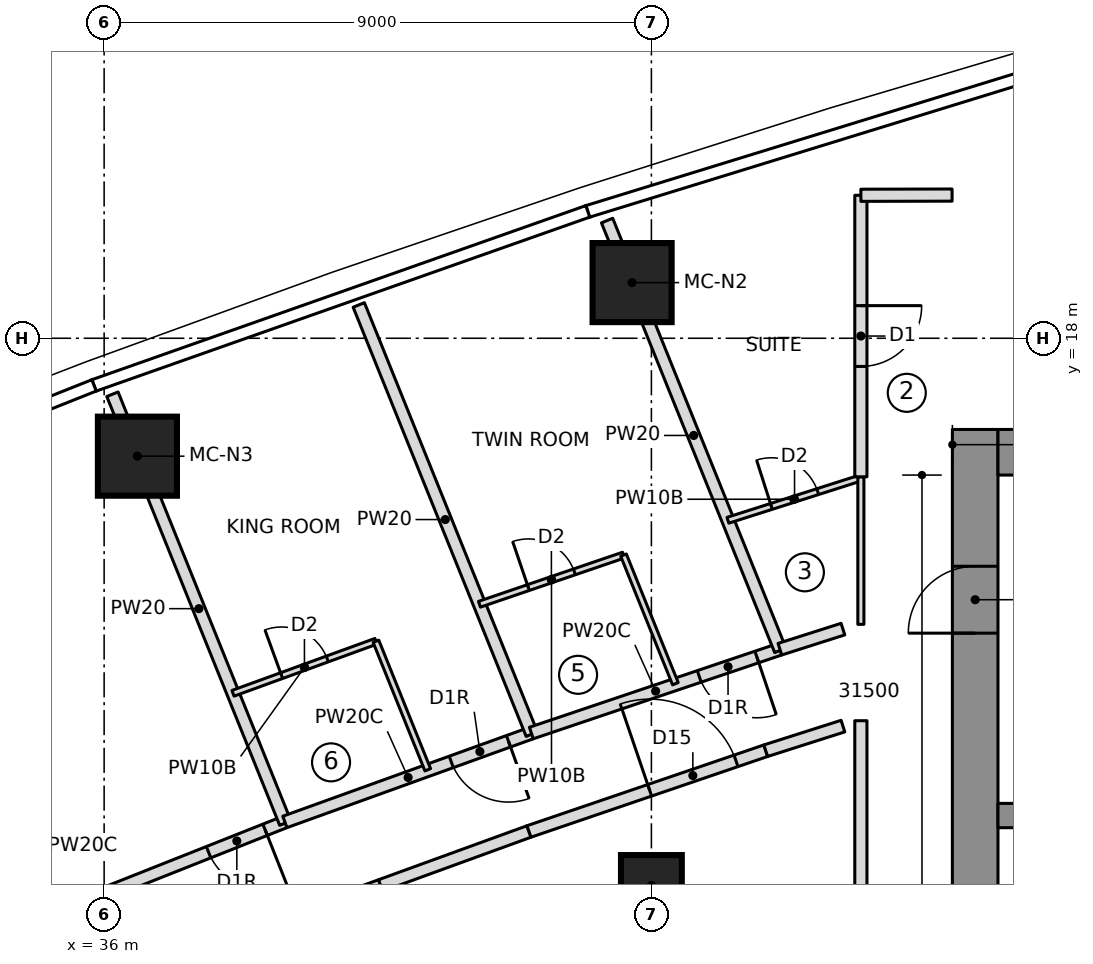
"""IFC4 building model, lengths in metres.
Left out: names, types, materials, properties, quantities, classifications, styles, units other than length and angle.
Written with IfcOpenShell. Run it as: python <this file> out.ifc"""

import sys

from ifc_helpers import new_model, si_unit, direction, frame, frame_2d, origin, origin_2d, place, context, subcontext, project, spatial, rectangle, extrude, element, fill, save


model = new_model("IFC4")
c1 = context("Model", 3, precision=1e-05, world=origin(), true_north=direction((0.0, 1.0)))
c2 = subcontext(c1, "Body", "Model", "MODEL_VIEW")
j1 = project(units=[si_unit("LENGTHUNIT", "METRE"), si_unit("PLANEANGLEUNIT", "RADIAN")], contexts=[c1])
p1 = place(None, origin())
s1 = spatial("IfcSite", under=j1, at=p1, CompositionType="ELEMENT")
p2 = place(p1, origin())
s2 = spatial("IfcBuilding", under=s1, at=p2, CompositionType="ELEMENT")
p3 = place(p2, frame((0.0, 0.0, 175.5)))
s3 = spatial("IfcBuildingStorey", under=s2, at=p3, CompositionType="ELEMENT", Elevation=175.5)
p4 = place(p3, frame((50.325, 6.65, 0.0), z_axis=(0.0, 0.0, 1.0), x_axis=(0.0, 1.0, 0.0)))
e1 = element("IfcWall", 1, at=p4, inside=s3, PredefinedType="SHEAR", context=c2, shape_type="SweptSolid", body=[
    extrude(rectangle(XDim=9.85, YDim=0.75, at=frame_2d((4.925, 0.0))), origin(), (0.0, 0.0, 1.0), 3.55),
])
p5 = place(p4, frame((6.5, 0.0, 0.0)))
e2 = element("IfcOpeningElement", 2, at=p5, cuts=e1, PredefinedType="OPENING", context=c2, shape_type="SweptSolid", body=[
    extrude(rectangle(XDim=1.1, YDim=2.1, at=frame_2d((0.55, 1.05))), frame((0.0, 0.385, 0.0), z_axis=(0.0, -1.0, 0.0), x_axis=(1.0, 0.0, 0.0)), (0.0, 0.0, 1.0), 0.77),
])
p6 = place(p3, frame((50.7, 16.125, 0.0), z_axis=(0.0, 0.0, 1.0), x_axis=(1.0, 0.0, 0.0)))
e3 = element("IfcWall", 3, at=p6, inside=s3, PredefinedType="SHEAR", context=c2, shape_type="SweptSolid", body=[
    extrude(rectangle(XDim=13.77, YDim=0.75, at=frame_2d((6.885, 0.0))), origin(), (0.0, 0.0, 1.0), 3.55),
])
p7 = place(p3, frame((50.7, 10.15, 0.0), z_axis=(0.0, 0.0, 1.0), x_axis=(1.0, 0.0, 0.0)))
e4 = element("IfcWall", 4, at=p7, inside=s3, PredefinedType="SHEAR", context=c2, shape_type="SweptSolid", body=[
    extrude(rectangle(XDim=13.02, YDim=0.4, at=frame_2d((6.51, 0.0))), origin(), (0.0, 0.0, 1.0), 3.55),
])
p8 = place(p7, frame((0.7, 0.0, 0.0)))
e5 = element("IfcOpeningElement", 5, at=p8, cuts=e4, PredefinedType="OPENING", context=c2, shape_type="SweptSolid", body=[
    extrude(rectangle(XDim=1.1, YDim=2.1, at=frame_2d((0.55, 1.05))), frame((0.0, 0.21, 0.0), z_axis=(0.0, -1.0, 0.0), x_axis=(1.0, 0.0, 0.0)), (0.0, 0.0, 1.0), 0.42),
])
p9 = place(p7, frame((3.5, 0.0, 0.0)))
e6 = element("IfcOpeningElement", 6, at=p9, cuts=e4, PredefinedType="OPENING", context=c2, shape_type="SweptSolid", body=[
    extrude(rectangle(XDim=1.1, YDim=2.1, at=frame_2d((0.55, 1.05))), frame((0.0, 0.21, 0.0), z_axis=(0.0, -1.0, 0.0), x_axis=(1.0, 0.0, 0.0)), (0.0, 0.0, 1.0), 0.42),
])
for number, where, z_axis, x_axis in (
    (7, (44.683, 18.916, 0.0), (0.0, 0.0, 1.0), (1.0, 0.0, 0.0)),
    (8, (36.547, 16.061, 0.0), (0.0, 0.0, 1.0), (1.0, 0.0, 0.0)),
):
    element("IfcColumn", number, at=place(p3, frame(where, z_axis=z_axis, x_axis=x_axis)), inside=s3, PredefinedType="COLUMN", context=c2, shape_type="SweptSolid", body=[
        extrude(rectangle(XDim=1.3, YDim=1.3, at=origin_2d()), origin(), (0.0, 0.0, 1.0), 3.55),
    ])
p10 = place(p3, frame((45.0, 9.0, 0.0), z_axis=(0.0, 0.0, 1.0), x_axis=(1.0, 0.0, 0.0)))
e9 = element("IfcColumn", 9, at=p10, inside=s3, PredefinedType="COLUMN", context=c2, shape_type="SweptSolid", body=[
    extrude(rectangle(XDim=1.0, YDim=1.0, at=origin_2d()), origin(), (0.0, 0.0, 1.0), 3.55),
])
p11 = place(p3, frame((38.972, 10.045, 0.0), z_axis=(0.0, 0.0, 1.0), x_axis=(-0.929554647243, -0.368684360651, 0.0)))
e10 = element("IfcWall", 10, at=p11, inside=s3, PredefinedType="PARTITIONING", context=c2, shape_type="SweptSolid", body=[
    extrude(rectangle(XDim=8.622, YDim=0.2, at=frame_2d((4.311, 0.0))), origin(), (0.0, 0.0, 1.0), 3.25),
])
p12 = place(p11, frame((0.35, 0.0, 0.0)))
e11 = element("IfcOpeningElement", 11, at=p12, cuts=e10, PredefinedType="OPENING", context=c2, shape_type="SweptSolid", body=[
    extrude(rectangle(XDim=1.0, YDim=2.1, at=frame_2d((0.5, 1.05))), frame((0.0, 0.11, 0.0), z_axis=(0.0, -1.0, 0.0), x_axis=(1.0, 0.0, 0.0)), (0.0, 0.0, 1.0), 0.22),
])
p13 = place(p3, frame((38.98, 10.026, 0.0), z_axis=(0.0, 0.0, 1.0), x_axis=(-0.373863662938, 0.927483671843, 0.0)))
e12 = element("IfcWall", 12, at=p13, inside=s3, PredefinedType="PARTITIONING", context=c2, shape_type="SweptSolid", body=[
    extrude(rectangle(XDim=7.604, YDim=0.2, at=frame_2d((3.802, 0.0))), origin(), (0.0, 0.0, 1.0), 3.25),
])
p14 = place(p3, frame((43.026, 11.507, 0.0), z_axis=(0.0, 0.0, 1.0), x_axis=(-0.940653905433, -0.339367397069, 0.0)))
e13 = element("IfcWall", 13, at=p14, inside=s3, PredefinedType="PARTITIONING", context=c2, shape_type="SweptSolid", body=[
    extrude(rectangle(XDim=4.309, YDim=0.2, at=frame_2d((2.155, 0.0))), origin(), (0.0, 0.0, 1.0), 3.25),
])
p15 = place(p14, frame((0.4, 0.0, 0.0)))
e14 = element("IfcOpeningElement", 14, at=p15, cuts=e13, PredefinedType="OPENING", context=c2, shape_type="SweptSolid", body=[
    extrude(rectangle(XDim=1.0, YDim=2.1, at=frame_2d((0.5, 1.05))), frame((0.0, 0.11, 0.0), z_axis=(0.0, -1.0, 0.0), x_axis=(1.0, 0.0, 0.0)), (0.0, 0.0, 1.0), 0.22),
])
p16 = place(p3, frame((38.119, 12.161, 0.0), z_axis=(0.0, 0.0, 1.0), x_axis=(0.939744972593, 0.341876273652, 0.0)))
e15 = element("IfcWall", 15, at=p16, inside=s3, PredefinedType="PARTITIONING", context=c2, shape_type="SweptSolid", body=[
    extrude(rectangle(XDim=2.501, YDim=0.1, at=frame_2d((1.251, 0.0))), origin(), (0.0, 0.0, 1.0), 3.25),
])
p17 = place(p16, frame((0.85, 0.0, 0.0)))
e16 = element("IfcOpeningElement", 16, at=p17, cuts=e15, PredefinedType="OPENING", context=c2, shape_type="SweptSolid", body=[
    extrude(rectangle(XDim=0.8, YDim=2.1, at=frame_2d((0.4, 1.05))), frame((0.0, 0.06, 0.0), z_axis=(0.0, -1.0, 0.0), x_axis=(1.0, 0.0, 0.0)), (0.0, 0.0, 1.0), 0.12),
])
p18 = place(p3, frame((40.47, 13.016, 0.0), z_axis=(0.0, 0.0, 1.0), x_axis=(0.373846436826, -0.927490615409, 0.0)))
e17 = element("IfcWall", 17, at=p18, inside=s3, PredefinedType="PARTITIONING", context=c2, shape_type="SweptSolid", body=[
    extrude(rectangle(XDim=2.279, YDim=0.1, at=frame_2d((1.139, 0.0))), origin(), (0.0, 0.0, 1.0), 3.25),
])
p19 = place(p3, frame((43.033, 11.489, 0.0), z_axis=(0.0, 0.0, 1.0), x_axis=(-0.373877998371, 0.927477893178, 0.0)))
e18 = element("IfcWall", 18, at=p19, inside=s3, PredefinedType="PARTITIONING", context=c2, shape_type="SweptSolid", body=[
    extrude(rectangle(XDim=7.611, YDim=0.2, at=frame_2d((3.806, 0.0))), origin(), (0.0, 0.0, 1.0), 3.25),
])
p20 = place(p3, frame((47.113, 12.886, 0.0), z_axis=(0.0, 0.0, 1.0), x_axis=(-0.947550995841, -0.319604615549, 0.0)))
e19 = element("IfcWall", 19, at=p20, inside=s3, PredefinedType="PARTITIONING", context=c2, shape_type="SweptSolid", body=[
    extrude(rectangle(XDim=4.314, YDim=0.2, at=frame_2d((2.157, 0.0))), origin(), (0.0, 0.0, 1.0), 3.25),
])
p21 = place(p20, frame((0.4, 0.0, 0.0)))
e20 = element("IfcOpeningElement", 20, at=p21, cuts=e19, PredefinedType="OPENING", context=c2, shape_type="SweptSolid", body=[
    extrude(rectangle(XDim=1.0, YDim=2.1, at=frame_2d((0.5, 1.05))), frame((0.0, 0.11, 0.0), z_axis=(0.0, -1.0, 0.0), x_axis=(1.0, 0.0, 0.0)), (0.0, 0.0, 1.0), 0.22),
])
p22 = place(p3, frame((42.172, 13.625, 0.0), z_axis=(0.0, 0.0, 1.0), x_axis=(0.946406575113, 0.322977699822, 0.0)))
e21 = element("IfcWall", 21, at=p22, inside=s3, PredefinedType="PARTITIONING", context=c2, shape_type="SweptSolid", body=[
    extrude(rectangle(XDim=2.504, YDim=0.1, at=frame_2d((1.252, 0.0))), origin(), (0.0, 0.0, 1.0), 3.25),
])
p23 = place(p22, frame((0.85, 0.0, 0.0)))
e22 = element("IfcOpeningElement", 22, at=p23, cuts=e21, PredefinedType="OPENING", context=c2, shape_type="SweptSolid", body=[
    extrude(rectangle(XDim=0.8, YDim=2.1, at=frame_2d((0.4, 1.05))), frame((0.0, 0.06, 0.0), z_axis=(0.0, -1.0, 0.0), x_axis=(1.0, 0.0, 0.0)), (0.0, 0.0, 1.0), 0.12),
])
p24 = place(p3, frame((44.542, 14.434, 0.0), z_axis=(0.0, 0.0, 1.0), x_axis=(0.373917841166, -0.927461831052, 0.0)))
e23 = element("IfcWall", 23, at=p24, inside=s3, PredefinedType="PARTITIONING", context=c2, shape_type="SweptSolid", body=[
    extrude(rectangle(XDim=2.281, YDim=0.1, at=frame_2d((1.14, 0.0))), origin(), (0.0, 0.0, 1.0), 3.25),
])
p25 = place(p3, frame((47.121, 12.867, 0.0), z_axis=(0.0, 0.0, 1.0), x_axis=(-0.373907892596, 0.92746584188, 0.0)))
e24 = element("IfcWall", 24, at=p25, inside=s3, PredefinedType="PARTITIONING", context=c2, shape_type="SweptSolid", body=[
    extrude(rectangle(XDim=7.621, YDim=0.2, at=frame_2d((3.811, 0.0))), origin(), (0.0, 0.0, 1.0), 3.25),
])
p26 = place(p3, frame((46.259, 15.007, 0.0), z_axis=(0.0, 0.0, 1.0), x_axis=(0.952731222045, 0.303814447552, 0.0)))
e25 = element("IfcWall", 25, at=p26, inside=s3, PredefinedType="PARTITIONING", context=c2, shape_type="SweptSolid", body=[
    extrude(rectangle(XDim=2.277, YDim=0.1, at=frame_2d((1.138, 0.0))), origin(), (0.0, 0.0, 1.0), 3.25),
])
p27 = place(p26, frame((0.75, 0.0, 0.0)))
e26 = element("IfcOpeningElement", 26, at=p27, cuts=e25, PredefinedType="OPENING", context=c2, shape_type="SweptSolid", body=[
    extrude(rectangle(XDim=0.8, YDim=2.1, at=frame_2d((0.4, 1.05))), frame((0.0, 0.06, 0.0), z_axis=(0.0, -1.0, 0.0), x_axis=(1.0, 0.0, 0.0)), (0.0, 0.0, 1.0), 0.12),
])
p28 = place(p3, frame((39.115, 8.479, 0.0), z_axis=(0.0, 0.0, 1.0), x_axis=(0.939741934926, 0.341884623435, 0.0)))
e27 = element("IfcWall", 27, at=p28, inside=s3, PredefinedType="PARTITIONING", context=c2, shape_type="SweptSolid", body=[
    extrude(rectangle(XDim=1.523, YDim=0.2, at=frame_2d((0.762, 0.0))), origin(), (0.0, 0.0, 1.0), 3.25),
])
p29 = place(p3, frame((42.984, 9.887, 0.0), z_axis=(0.0, 0.0, 1.0), x_axis=(0.946436071896, 0.322891253852, 0.0)))
e28 = element("IfcWall", 28, at=p29, inside=s3, PredefinedType="PARTITIONING", context=c2, shape_type="SweptSolid", body=[
    extrude(rectangle(XDim=4.117, YDim=0.2, at=frame_2d((2.059, 0.0))), origin(), (0.0, 0.0, 1.0), 3.25),
])
p30 = place(p29, frame((2.1, 0.0, 0.0)))
e29 = element("IfcOpeningElement", 29, at=p30, cuts=e28, PredefinedType="OPENING", context=c2, shape_type="SweptSolid", body=[
    extrude(rectangle(XDim=1.5, YDim=2.1, at=frame_2d((0.75, 1.05))), frame((0.0, 0.11, 0.0), z_axis=(0.0, -1.0, 0.0), x_axis=(1.0, 0.0, 0.0)), (0.0, 0.0, 1.0), 0.22),
])
p31 = place(p3, frame((40.547, 9.0, 0.0), z_axis=(0.0, 0.0, 1.0), x_axis=(0.939719202565, 0.341947101655, 0.0)))
e30 = element("IfcWall", 30, at=p31, inside=s3, PredefinedType="PARTITIONING", context=c2, shape_type="SweptSolid", body=[
    extrude(rectangle(XDim=2.594, YDim=0.2, at=frame_2d((1.297, 0.0))), origin(), (0.0, 0.0, 1.0), 3.25),
])
p32 = place(p3, frame((48.445, 15.721, 0.0), z_axis=(0.0, 0.0, 1.0), x_axis=(0.0, -1.0, 0.0)))
e31 = element("IfcWall", 31, at=p32, inside=s3, PredefinedType="PARTITIONING", context=c2, shape_type="SweptSolid", body=[
    extrude(rectangle(XDim=2.426, YDim=0.1, at=frame_2d((1.213, 0.0))), origin(), (0.0, 0.0, 1.0), 3.25),
])
p33 = place(p3, frame((48.15, 13.217, 0.0), z_axis=(0.0, 0.0, 1.0), x_axis=(-0.952731090451, -0.303814860215, 0.0)))
e32 = element("IfcWall", 32, at=p33, inside=s3, PredefinedType="PARTITIONING", context=c2, shape_type="SweptSolid", body=[
    extrude(rectangle(XDim=1.088, YDim=0.2, at=frame_2d((0.544, 0.0))), origin(), (0.0, 0.0, 1.0), 3.25),
])
p34 = place(p3, frame((46.881, 11.217, 0.0), z_axis=(0.0, 0.0, 1.0), x_axis=(0.952761948983, 0.303718074157, 0.0)))
e33 = element("IfcWall", 33, at=p34, inside=s3, PredefinedType="PARTITIONING", context=c2, shape_type="SweptSolid", body=[
    extrude(rectangle(XDim=1.332, YDim=0.2, at=frame_2d((0.666, 0.0))), origin(), (0.0, 0.0, 1.0), 3.25),
])
p35 = place(p3, frame((48.445, 20.352, 0.0), z_axis=(0.0, 0.0, 1.0), x_axis=(-5.2725931e-05, -0.99999999861, 0.0)))
e34 = element("IfcWall", 34, at=p35, inside=s3, PredefinedType="PARTITIONING", context=c2, shape_type="SweptSolid", body=[
    extrude(rectangle(XDim=4.63, YDim=0.2, at=frame_2d((2.315, 0.0))), origin(), (0.0, 0.0, 1.0), 3.25),
])
p36 = place(p35, frame((1.815, 0.0, 0.0)))
e35 = element("IfcOpeningElement", 35, at=p36, cuts=e34, PredefinedType="OPENING", context=c2, shape_type="SweptSolid", body=[
    extrude(rectangle(XDim=1.0, YDim=2.1, at=frame_2d((0.5, 1.05))), frame((0.0, 0.11, 0.0), z_axis=(0.0, -1.0, 0.0), x_axis=(1.0, 0.0, 0.0)), (0.0, 0.0, 1.0), 0.22),
])
p37 = place(p3, frame((48.445, 11.71, 0.0), z_axis=(0.0, 0.0, 1.0), x_axis=(0.0, -1.0, 0.0)))
e36 = element("IfcWall", 36, at=p37, inside=s3, PredefinedType="PARTITIONING", context=c2, shape_type="SweptSolid", body=[
    extrude(rectangle(XDim=23.42, YDim=0.2, at=frame_2d((11.71, 0.0))), origin(), (0.0, 0.0, 1.0), 3.25),
])
p38 = place(p3, frame((49.945, 20.355, 0.0), z_axis=(0.0, 0.0, 1.0), x_axis=(-0.999997403051, -0.002279010849, 0.0)))
e37 = element("IfcWall", 37, at=p38, inside=s3, PredefinedType="PARTITIONING", context=c2, shape_type="SweptSolid", body=[
    extrude(rectangle(XDim=1.5, YDim=0.2, at=frame_2d((0.75, 0.0))), origin(), (0.0, 0.0, 1.0), 3.25),
])
p39 = place(p12, origin())
e38 = element("IfcDoor", 38, at=p39, inside=s3, OperationType="SINGLE_SWING_RIGHT", PredefinedType="DOOR", context=c2, shape_type="SweptSolid", body=[
    extrude(rectangle(XDim=1.0, YDim=2.1, at=frame_2d((0.5, 1.05))), frame((0.0, 0.025, 0.0), z_axis=(0.0, -1.0, 0.0), x_axis=(1.0, 0.0, 0.0)), (0.0, 0.0, 1.0), 0.05),
])
fill(e11, e38)
p40 = place(p17, origin())
e39 = element("IfcDoor", 39, at=p40, inside=s3, OperationType="SINGLE_SWING_LEFT", PredefinedType="DOOR", context=c2, shape_type="SweptSolid", body=[
    extrude(rectangle(XDim=0.8, YDim=2.1, at=frame_2d((0.4, 1.05))), frame((0.0, 0.025, 0.0), z_axis=(0.0, -1.0, 0.0), x_axis=(1.0, 0.0, 0.0)), (0.0, 0.0, 1.0), 0.05),
])
fill(e16, e39)
p41 = place(p15, origin())
e40 = element("IfcDoor", 40, at=p41, inside=s3, OperationType="SINGLE_SWING_RIGHT", PredefinedType="DOOR", context=c2, shape_type="SweptSolid", body=[
    extrude(rectangle(XDim=1.0, YDim=2.1, at=frame_2d((0.5, 1.05))), frame((0.0, 0.025, 0.0), z_axis=(0.0, -1.0, 0.0), x_axis=(1.0, 0.0, 0.0)), (0.0, 0.0, 1.0), 0.05),
])
fill(e14, e40)
p42 = place(p23, origin())
e41 = element("IfcDoor", 41, at=p42, inside=s3, OperationType="SINGLE_SWING_LEFT", PredefinedType="DOOR", context=c2, shape_type="SweptSolid", body=[
    extrude(rectangle(XDim=0.8, YDim=2.1, at=frame_2d((0.4, 1.05))), frame((0.0, 0.025, 0.0), z_axis=(0.0, -1.0, 0.0), x_axis=(1.0, 0.0, 0.0)), (0.0, 0.0, 1.0), 0.05),
])
fill(e22, e41)
p43 = place(p21, origin())
e42 = element("IfcDoor", 42, at=p43, inside=s3, OperationType="SINGLE_SWING_RIGHT", PredefinedType="DOOR", context=c2, shape_type="SweptSolid", body=[
    extrude(rectangle(XDim=1.0, YDim=2.1, at=frame_2d((0.5, 1.05))), frame((0.0, 0.025, 0.0), z_axis=(0.0, -1.0, 0.0), x_axis=(1.0, 0.0, 0.0)), (0.0, 0.0, 1.0), 0.05),
])
fill(e20, e42)
p44 = place(p27, origin())
e43 = element("IfcDoor", 43, at=p44, inside=s3, OperationType="SINGLE_SWING_LEFT", PredefinedType="DOOR", context=c2, shape_type="SweptSolid", body=[
    extrude(rectangle(XDim=0.8, YDim=2.1, at=frame_2d((0.4, 1.05))), frame((0.0, 0.025, 0.0), z_axis=(0.0, -1.0, 0.0), x_axis=(1.0, 0.0, 0.0)), (0.0, 0.0, 1.0), 0.05),
])
fill(e26, e43)
p45 = place(p30, origin())
e44 = element("IfcDoor", 44, at=p45, inside=s3, OperationType="DOUBLE_DOOR_SINGLE_SWING", PredefinedType="DOOR", context=c2, shape_type="SweptSolid", body=[
    extrude(rectangle(XDim=1.5, YDim=2.1, at=frame_2d((0.75, 1.05))), frame((0.0, 0.025, 0.0), z_axis=(0.0, -1.0, 0.0), x_axis=(1.0, 0.0, 0.0)), (0.0, 0.0, 1.0), 0.05),
])
fill(e29, e44)
p46 = place(p36, origin())
e45 = element("IfcDoor", 45, at=p46, inside=s3, OperationType="SINGLE_SWING_LEFT", PredefinedType="DOOR", context=c2, shape_type="SweptSolid", body=[
    extrude(rectangle(XDim=1.0, YDim=2.1, at=frame_2d((0.5, 1.05))), frame((0.0, 0.025, 0.0), z_axis=(0.0, -1.0, 0.0), x_axis=(1.0, 0.0, 0.0)), (0.0, 0.0, 1.0), 0.05),
])
fill(e35, e45)
p47 = place(p5, origin())
e46 = element("IfcDoor", 46, at=p47, inside=s3, OperationType="SINGLE_SWING_RIGHT", PredefinedType="DOOR", context=c2, shape_type="SweptSolid", body=[
    extrude(rectangle(XDim=1.1, YDim=2.1, at=frame_2d((0.55, 1.05))), frame((0.0, 0.025, 0.0), z_axis=(0.0, -1.0, 0.0), x_axis=(1.0, 0.0, 0.0)), (0.0, 0.0, 1.0), 0.05),
])
fill(e2, e46)
save(model, sys.argv[1])
